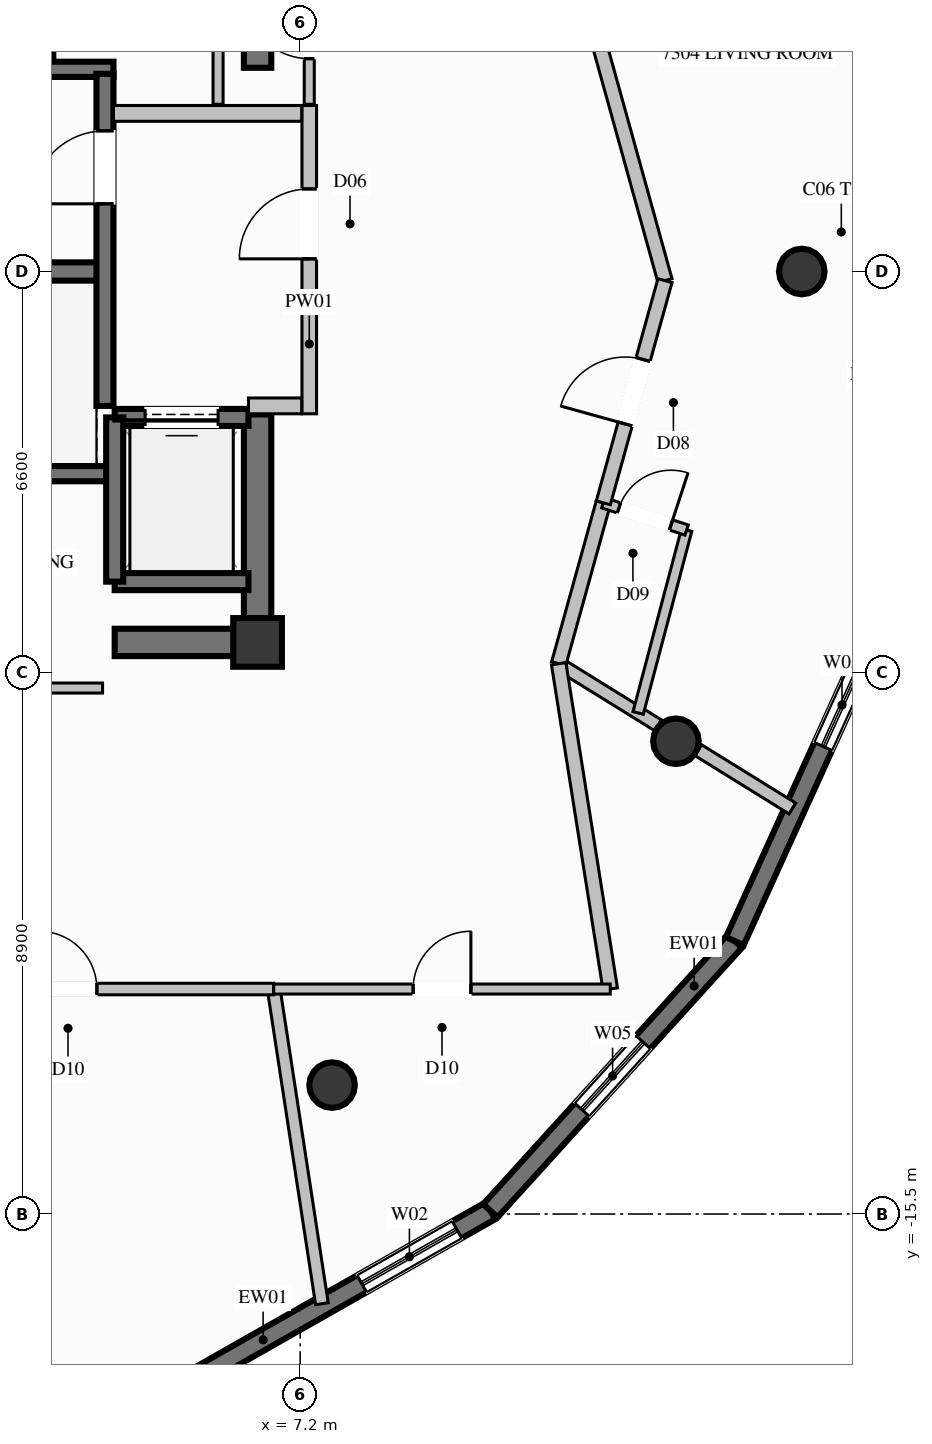
"""IFC4 building model, lengths in metres.
Left out: names, types, materials, properties, quantities, classifications, styles, units other than length and angle.
Written with IfcOpenShell. Run it as: python <this file> out.ifc"""

import sys

from ifc_helpers import new_model, si_unit, direction, frame, frame_2d, origin, origin_2d, place, context, subcontext, project, spatial, rectangle, circle, extrude, element, fill, save


model = new_model("IFC4")
c1 = context("Model", 3, precision=1e-05, world=origin(), true_north=direction((0.0, 1.0)))
c2 = subcontext(c1, "Body", "Model", "MODEL_VIEW")
j1 = project(units=[si_unit("LENGTHUNIT", "METRE"), si_unit("PLANEANGLEUNIT", "RADIAN")], contexts=[c1])
p1 = place(None, origin())
s1 = spatial("IfcSite", under=j1, at=p1, CompositionType="ELEMENT")
p2 = place(p1, origin())
s2 = spatial("IfcBuilding", under=s1, at=p2, CompositionType="ELEMENT")
p3 = place(p2, frame((0.0, 0.0, 274.4)))
s3 = spatial("IfcBuildingStorey", under=s2, at=p3, CompositionType="ELEMENT", Elevation=274.4)
p4 = place(p3, frame((6.5, -6.1, 0.0), z_axis=(0.0, 0.0, 1.0), x_axis=(1.0, 0.0, 0.0)))
e1 = element("IfcColumn", 1, at=p4, inside=s3, PredefinedType="COLUMN", context=c2, shape_type="SweptSolid", body=[
    extrude(rectangle(XDim=0.8, YDim=0.8, at=origin_2d()), origin(), (0.0, 0.0, 1.0), 3.8),
])
p5 = place(p3, frame((-3.99, 0.0, 0.0), z_axis=(0.0, 0.0, 1.0), x_axis=(1.0, 0.0, 0.0)))
e2 = element("IfcWall", 2, at=p5, inside=s3, PredefinedType="SHEAR", context=c2, shape_type="SweptSolid", body=[
    extrude(rectangle(XDim=7.98, YDim=0.3, at=frame_2d((3.99, 0.0))), origin(), (0.0, 0.0, 1.0), 3.8),
])
for number, where, z_axis, x_axis in (
    (3, (-4.13, -3.325, 0.0), (0.0, 0.0, 1.0), (1.0, 0.0, 0.0)),
    (4, (-4.13, 3.325, 0.0), (0.0, 0.0, 1.0), (1.0, 0.0, 0.0)),
):
    element("IfcWall", number, at=place(p3, frame(where, z_axis=z_axis, x_axis=x_axis)), inside=s3, PredefinedType="SOLIDWALL", context=c2, shape_type="SweptSolid", body=[
        extrude(rectangle(XDim=8.26, YDim=0.25, at=frame_2d((4.13, 0.0))), origin(), (0.0, 0.0, 1.0), 3.8),
    ])
p6 = place(p3, frame((4.15, -6.1, 0.0), z_axis=(0.0, 0.0, 1.0), x_axis=(1.0, 0.0, 0.0)))
e5 = element("IfcWall", 5, at=p6, inside=s3, PredefinedType="SHEAR", context=c2, shape_type="SweptSolid", body=[
    extrude(rectangle(XDim=2.125, YDim=0.45, at=frame_2d((1.062, 0.0))), origin(), (0.0, 0.0, 1.0), 3.8),
])
p7 = place(p3, frame((6.5, -6.325, 0.0), z_axis=(0.0, 0.0, 1.0), x_axis=(0.0, 1.0, 0.0)))
e6 = element("IfcWall", 6, at=p7, inside=s3, PredefinedType="SHEAR", context=c2, shape_type="SweptSolid", body=[
    extrude(rectangle(XDim=3.975, YDim=0.45, at=frame_2d((1.987, 0.0))), origin(), (0.0, 0.0, 1.0), 3.8),
])
p8 = place(p3, frame((6.5, 3.35, 0.0), z_axis=(0.0, 0.0, 1.0), x_axis=(0.0, 1.0, 0.0)))
e7 = element("IfcWall", 7, at=p8, inside=s3, PredefinedType="SHEAR", context=c2, shape_type="SweptSolid", body=[
    extrude(rectangle(XDim=2.975, YDim=0.45, at=frame_2d((1.487, 0.0))), origin(), (0.0, 0.0, 1.0), 3.8),
])
for number, where, z_axis, x_axis in (
    (8, (15.45, 0.0, 0.0), (0.0, 0.0, 1.0), (1.0, 0.0, 0.0)),
    (9, (7.725, -13.38, 0.0), (0.0, 0.0, 1.0), (1.0, 0.0, 0.0)),
    (10, (13.38, -7.725, 0.0), (0.0, 0.0, 1.0), (1.0, 0.0, 0.0)),
):
    element("IfcColumn", number, at=place(p3, frame(where, z_axis=z_axis, x_axis=x_axis)), inside=s3, PredefinedType="COLUMN", context=c2, shape_type="SweptSolid", body=[
        extrude(circle(Radius=0.375, at=origin_2d()), origin(), (0.0, 0.0, 1.0), 3.8),
    ])
p9 = place(p3, frame((10.329, -15.446, 0.0), z_axis=(0.0, 0.0, 1.0), x_axis=(-0.869520200799, -0.493897378413, 0.0)))
e11 = element("IfcWall", 11, at=p9, inside=s3, PredefinedType="SOLIDWALL", context=c2, shape_type="SweptSolid", body=[
    extrude(rectangle(XDim=5.916, YDim=0.32, at=frame_2d((2.958, 0.0))), origin(), (0.0, 0.0, 1.0), 3.57),
])
p10 = place(p9, frame((0.632, 0.0, 0.35)))
e12 = element("IfcOpeningElement", 12, at=p10, cuts=e11, PredefinedType="OPENING", context=c2, shape_type="SweptSolid", body=[
    extrude(rectangle(XDim=1.8, YDim=2.6, at=frame_2d((0.9, 1.3))), frame((0.0, 0.17, 0.0), z_axis=(0.0, -1.0, 0.0), x_axis=(1.0, 0.0, 0.0)), (0.0, 0.0, 1.0), 0.34),
])
p11 = place(p3, frame((14.349, -11.012, 0.0), z_axis=(0.0, 0.0, 1.0), x_axis=(-0.67166919047, -0.740851198671, 0.0)))
e13 = element("IfcWall", 13, at=p11, inside=s3, PredefinedType="SOLIDWALL", context=c2, shape_type="SweptSolid", body=[
    extrude(rectangle(XDim=5.985, YDim=0.32, at=frame_2d((2.993, 0.0))), origin(), (0.0, 0.0, 1.0), 3.57),
])
p12 = place(p11, frame((2.243, 0.0, 0.85)))
e14 = element("IfcOpeningElement", 14, at=p12, cuts=e13, PredefinedType="OPENING", context=c2, shape_type="SweptSolid", body=[
    extrude(rectangle(XDim=1.5, YDim=1.2, at=frame_2d((0.75, 0.6))), frame((0.0, 0.17, 0.0), z_axis=(0.0, -1.0, 0.0), x_axis=(1.0, 0.0, 0.0)), (0.0, 0.0, 1.0), 0.34),
])
p13 = place(p3, frame((16.851, -5.5, 0.0), z_axis=(0.0, 0.0, 1.0), x_axis=(-0.413325805639, -0.910583207836, 0.0)))
e15 = element("IfcWall", 15, at=p13, inside=s3, PredefinedType="SOLIDWALL", context=c2, shape_type="SweptSolid", body=[
    extrude(rectangle(XDim=6.053, YDim=0.32, at=frame_2d((3.027, 0.0))), origin(), (0.0, 0.0, 1.0), 3.57),
])
p14 = place(p13, frame((1.038, 0.0, 0.85)))
e16 = element("IfcOpeningElement", 16, at=p14, cuts=e15, PredefinedType="OPENING", context=c2, shape_type="SweptSolid", body=[
    extrude(rectangle(XDim=1.5, YDim=1.2, at=frame_2d((0.75, 0.6))), frame((0.0, 0.17, 0.0), z_axis=(0.0, -1.0, 0.0), x_axis=(1.0, 0.0, 0.0)), (0.0, 0.0, 1.0), 0.34),
])
p15 = place(p3, frame((3.0, 3.5, 0.0), z_axis=(0.0, 0.0, 1.0), x_axis=(0.0, 1.0, 0.0)))
e17 = element("IfcWall", 17, at=p15, inside=s3, PredefinedType="SOLIDWALL", context=c2, shape_type="SweptSolid", body=[
    extrude(rectangle(XDim=2.5, YDim=0.28, at=frame_2d((1.25, 0.0))), origin(), (0.0, 0.0, 1.0), 3.57),
])
p16 = place(p3, frame((4.15, -5.1, 0.0), z_axis=(0.0, 0.0, 1.0), x_axis=(1.0, 0.0, 0.0)))
e18 = element("IfcWall", 18, at=p16, inside=s3, PredefinedType="SOLIDWALL", context=c2, shape_type="SweptSolid", body=[
    extrude(rectangle(XDim=2.2, YDim=0.28, at=frame_2d((1.1, 0.0))), origin(), (0.0, 0.0, 1.0), 3.57),
])
p17 = place(p3, frame((6.35, -2.4, 0.0), z_axis=(0.0, 0.0, 1.0), x_axis=(-1.0, 0.0, 0.0)))
e19 = element("IfcWall", 19, at=p17, inside=s3, PredefinedType="SOLIDWALL", context=c2, shape_type="SweptSolid", body=[
    extrude(rectangle(XDim=2.2, YDim=0.28, at=frame_2d((1.1, 0.0))), origin(), (0.0, 0.0, 1.0), 3.57),
])
p18 = place(p17, frame((0.5, 0.0, 0.0)))
e20 = element("IfcOpeningElement", 20, at=p18, cuts=e19, PredefinedType="OPENING", context=c2, shape_type="SweptSolid", body=[
    extrude(rectangle(XDim=1.2, YDim=2.2, at=frame_2d((0.6, 1.1))), frame((0.0, 0.15, 0.0), z_axis=(0.0, -1.0, 0.0), x_axis=(1.0, 0.0, 0.0)), (0.0, 0.0, 1.0), 0.3),
])
p19 = place(p3, frame((4.15, -2.4, 0.0), z_axis=(0.0, 0.0, 1.0), x_axis=(0.0, -1.0, 0.0)))
e21 = element("IfcWall", 21, at=p19, inside=s3, PredefinedType="SOLIDWALL", context=c2, shape_type="SweptSolid", body=[
    extrude(rectangle(XDim=2.7, YDim=0.28, at=frame_2d((1.35, 0.0))), origin(), (0.0, 0.0, 1.0), 3.57),
])
p20 = place(p3, frame((3.99, -2.21, 0.0), z_axis=(0.0, 0.0, 1.0), x_axis=(0.0, 1.0, 0.0)))
e22 = element("IfcWall", 22, at=p20, inside=s3, PredefinedType="SOLIDWALL", context=c2, shape_type="SweptSolid", body=[
    extrude(rectangle(XDim=5.46, YDim=0.28, at=frame_2d((2.73, 0.0))), origin(), (0.0, 0.0, 1.0), 3.57),
])
p21 = place(p20, frame((3.323, 0.0, 0.0)))
e23 = element("IfcOpeningElement", 23, at=p21, cuts=e22, PredefinedType="OPENING", context=c2, shape_type="SweptSolid", body=[
    extrude(rectangle(XDim=1.2, YDim=2.2, at=frame_2d((0.6, 1.1))), frame((0.0, 0.15, 0.0), z_axis=(0.0, -1.0, 0.0), x_axis=(1.0, 0.0, 0.0)), (0.0, 0.0, 1.0), 0.3),
])
p22 = place(p3, frame((7.35, -2.34, 0.0), z_axis=(0.0, 0.0, 1.0), x_axis=(0.0, 1.0, 0.0)))
e24 = element("IfcWall", 24, at=p22, inside=s3, PredefinedType="PARTITIONING", context=c2, shape_type="SweptSolid", body=[
    extrude(rectangle(XDim=5.07, YDim=0.24, at=frame_2d((2.535, 0.0))), origin(), (0.0, 0.0, 1.0), 2.655),
])
p23 = place(p22, frame((2.548, 0.0, 0.0)))
e25 = element("IfcOpeningElement", 25, at=p23, cuts=e24, PredefinedType="OPENING", context=c2, shape_type="SweptSolid", body=[
    extrude(rectangle(XDim=1.15, YDim=2.2, at=frame_2d((0.575, 1.1))), frame((0.0, 0.13, 0.0), z_axis=(0.0, -1.0, 0.0), x_axis=(1.0, 0.0, 0.0)), (0.0, 0.0, 1.0), 0.26),
])
p24 = place(p3, frame((6.35, -2.21, 0.0), z_axis=(0.0, 0.0, 1.0), x_axis=(1.0, 0.0, 0.0)))
e26 = element("IfcWall", 26, at=p24, inside=s3, PredefinedType="PARTITIONING", context=c2, shape_type="SweptSolid", body=[
    extrude(rectangle(XDim=0.875, YDim=0.26, at=frame_2d((0.438, 0.0))), origin(), (0.0, 0.0, 1.0), 3.57),
])
p25 = place(p3, frame((4.13, 2.6, 0.0), z_axis=(0.0, 0.0, 1.0), x_axis=(1.0, 0.0, 0.0)))
e27 = element("IfcWall", 27, at=p25, inside=s3, PredefinedType="PARTITIONING", context=c2, shape_type="SweptSolid", body=[
    extrude(rectangle(XDim=3.095, YDim=0.26, at=frame_2d((1.548, 0.0))), origin(), (0.0, 0.0, 1.0), 3.57),
])
p26 = place(p3, frame((7.35, 2.75, 0.0), z_axis=(0.0, 0.0, 1.0), x_axis=(0.0, 1.0, 0.0)))
e28 = element("IfcWall", 28, at=p26, inside=s3, PredefinedType="PARTITIONING", context=c2, shape_type="SweptSolid", body=[
    extrude(rectangle(XDim=2.55, YDim=0.165, at=frame_2d((1.275, 0.0))), origin(), (0.0, 0.0, 1.0), 3.57),
])
p27 = place(p26, frame((0.75, 0.0, 0.0)))
e29 = element("IfcOpeningElement", 29, at=p27, cuts=e28, PredefinedType="OPENING", context=c2, shape_type="SweptSolid", body=[
    extrude(rectangle(XDim=1.05, YDim=2.15, at=frame_2d((0.525, 1.075))), frame((0.0, 0.093, 0.0), z_axis=(0.0, -1.0, 0.0), x_axis=(1.0, 0.0, 0.0)), (0.0, 0.0, 1.0), 0.185),
])
p28 = place(p3, frame((5.85, 5.3, 0.0), z_axis=(0.0, 0.0, 1.0), x_axis=(0.0, -1.0, 0.0)))
e30 = element("IfcWall", 30, at=p28, inside=s3, PredefinedType="PARTITIONING", context=c2, shape_type="SweptSolid", body=[
    extrude(rectangle(XDim=2.55, YDim=0.165, at=frame_2d((1.275, 0.0))), origin(), (0.0, 0.0, 1.0), 2.655),
])
p29 = place(p3, frame((-5.7, -6.85, 0.0), z_axis=(0.0, 0.0, 1.0), x_axis=(1.0, 0.0, 0.0)))
e31 = element("IfcWall", 31, at=p29, inside=s3, PredefinedType="PARTITIONING", context=c2, shape_type="SweptSolid", body=[
    extrude(rectangle(XDim=9.65, YDim=0.165, at=frame_2d((4.825, 0.0))), origin(), (0.0, 0.0, 1.0), 2.655),
])
p30 = place(p29, frame((4.35, 0.0, 0.0)))
e32 = element("IfcOpeningElement", 32, at=p30, cuts=e31, PredefinedType="OPENING", context=c2, shape_type="SweptSolid", body=[
    extrude(rectangle(XDim=0.95, YDim=2.1, at=frame_2d((0.475, 1.05))), frame((0.0, 0.093, 0.0), z_axis=(0.0, -1.0, 0.0), x_axis=(1.0, 0.0, 0.0)), (0.0, 0.0, 1.0), 0.185),
])
p31 = place(p3, frame((11.452, -6.45, 0.0), z_axis=(0.0, 0.0, 1.0), x_axis=(0.850026735641, -0.526739545407, 0.0)))
e33 = element("IfcWall", 33, at=p31, inside=s3, PredefinedType="PARTITIONING", context=c2, shape_type="SweptSolid", body=[
    extrude(rectangle(XDim=1.921, YDim=0.21, at=frame_2d((0.96, 0.0))), origin(), (0.0, 0.0, 1.0), 3.086),
])
p32 = place(p3, frame((13.747, -7.872, 0.0), z_axis=(0.0, 0.0, 1.0), x_axis=(0.850070781835, -0.526668459156, 0.0)))
e34 = element("IfcWall", 34, at=p32, inside=s3, PredefinedType="PARTITIONING", context=c2, shape_type="SweptSolid", body=[
    extrude(rectangle(XDim=1.821, YDim=0.21, at=frame_2d((0.91, 0.0))), origin(), (0.0, 0.0, 1.0), 3.57),
])
p33 = place(p3, frame((11.452, -6.45, 0.0), z_axis=(0.0, 0.0, 1.0), x_axis=(0.267350374135, 0.963599386389, 0.0)))
e35 = element("IfcWall", 35, at=p33, inside=s3, PredefinedType="PARTITIONING", context=c2, shape_type="SweptSolid", body=[
    extrude(rectangle(XDim=2.746, YDim=0.24, at=frame_2d((1.373, 0.0))), origin(), (0.0, 0.0, 1.0), 3.57),
])
p34 = place(p3, frame((12.759, -7.26, 0.0), z_axis=(0.0, 0.0, 1.0), x_axis=(0.256080164753, 0.966655548383, 0.0)))
e36 = element("IfcWall", 36, at=p34, inside=s3, PredefinedType="PLUMBINGWALL", context=c2, shape_type="SweptSolid", body=[
    extrude(rectangle(XDim=3.112, YDim=0.175, at=frame_2d((1.556, 0.0))), origin(), (0.0, 0.0, 1.0), 3.57),
])
p35 = place(p3, frame((12.186, -3.804, 0.0), z_axis=(0.0, 0.0, 1.0), x_axis=(0.950463569657, -0.310835974037, 0.0)))
e37 = element("IfcWall", 37, at=p35, inside=s3, PredefinedType="PLUMBINGWALL", context=c2, shape_type="SweptSolid", body=[
    extrude(rectangle(XDim=1.441, YDim=0.175, at=frame_2d((0.721, 0.0))), origin(), (0.0, 0.0, 1.0), 3.57),
])
p36 = place(p35, frame((0.271, 0.0, 0.0)))
e38 = element("IfcOpeningElement", 38, at=p36, cuts=e37, PredefinedType="OPENING", context=c2, shape_type="SweptSolid", body=[
    extrude(rectangle(XDim=0.9, YDim=2.1, at=frame_2d((0.45, 1.05))), frame((0.0, 0.098, 0.0), z_axis=(0.0, -1.0, 0.0), x_axis=(1.0, 0.0, 0.0)), (0.0, 0.0, 1.0), 0.195),
])
p37 = place(p3, frame((13.2, -0.15, 0.0), z_axis=(0.0, 0.0, 1.0), x_axis=(-0.267374214985, 0.963592771435, 0.0)))
e39 = element("IfcWall", 39, at=p37, inside=s3, PredefinedType="PARTITIONING", context=c2, shape_type="SweptSolid", body=[
    extrude(rectangle(XDim=6.538, YDim=0.24, at=frame_2d((3.269, 0.0))), origin(), (0.0, 0.0, 1.0), 3.57),
])
p38 = place(p3, frame((12.186, -3.804, 0.0), z_axis=(0.0, 0.0, 1.0), x_axis=(0.267374891444, 0.963592583733, 0.0)))
e40 = element("IfcWall", 40, at=p38, inside=s3, PredefinedType="PARTITIONING", context=c2, shape_type="SweptSolid", body=[
    extrude(rectangle(XDim=3.792, YDim=0.24, at=frame_2d((1.896, 0.0))), origin(), (0.0, 0.0, 1.0), 3.57),
])
p39 = place(p38, frame((1.346, 0.0, 0.0)))
e41 = element("IfcOpeningElement", 41, at=p39, cuts=e40, PredefinedType="OPENING", context=c2, shape_type="SweptSolid", body=[
    extrude(rectangle(XDim=1.1, YDim=2.3, at=frame_2d((0.55, 1.15))), frame((0.0, 0.13, 0.0), z_axis=(0.0, -1.0, 0.0), x_axis=(1.0, 0.0, 0.0)), (0.0, 0.0, 1.0), 0.26),
])
p40 = place(p3, frame((6.765, -11.8, 0.0), z_axis=(0.0, 0.0, 1.0), x_axis=(0.15150701221, -0.988456182767, 0.0)))
e42 = element("IfcWall", 42, at=p40, inside=s3, PredefinedType="PARTITIONING", context=c2, shape_type="SweptSolid", body=[
    extrude(rectangle(XDim=5.236, YDim=0.21, at=frame_2d((2.618, 0.0))), origin(), (0.0, 0.0, 1.0), 3.57),
])
p41 = place(p3, frame((0.0, -11.8, 0.0), z_axis=(0.0, 0.0, 1.0), x_axis=(1.0, 0.0, 0.0)))
e43 = element("IfcWall", 43, at=p41, inside=s3, PredefinedType="PARTITIONING", context=c2, shape_type="SweptSolid", body=[
    extrude(rectangle(XDim=6.765, YDim=0.19, at=frame_2d((3.382, 0.0))), origin(), (0.0, 0.0, 1.0), 3.57),
])
p42 = place(p41, frame((2.907, 0.0, 0.0)))
e44 = element("IfcOpeningElement", 44, at=p42, cuts=e43, PredefinedType="OPENING", context=c2, shape_type="SweptSolid", body=[
    extrude(rectangle(XDim=0.95, YDim=2.1, at=frame_2d((0.475, 1.05))), frame((0.0, 0.105, 0.0), z_axis=(0.0, -1.0, 0.0), x_axis=(1.0, 0.0, 0.0)), (0.0, 0.0, 1.0), 0.21),
])
p43 = place(p3, frame((12.3, -11.8, 0.0), z_axis=(0.0, 0.0, 1.0), x_axis=(-0.156573548098, 0.987666301964, 0.0)))
e45 = element("IfcWall", 45, at=p43, inside=s3, PredefinedType="PARTITIONING", context=c2, shape_type="SweptSolid", body=[
    extrude(rectangle(XDim=5.417, YDim=0.24, at=frame_2d((2.708, 0.0))), origin(), (0.0, 0.0, 1.0), 3.57),
])
p44 = place(p3, frame((6.765, -11.8, 0.0), z_axis=(0.0, 0.0, 1.0), x_axis=(1.0, 0.0, 0.0)))
e46 = element("IfcWall", 46, at=p44, inside=s3, PredefinedType="PARTITIONING", context=c2, shape_type="SweptSolid", body=[
    extrude(rectangle(XDim=5.535, YDim=0.165, at=frame_2d((2.768, 0.0))), origin(), (0.0, 0.0, 1.0), 3.57),
])
p45 = place(p44, frame((2.293, 0.0, 0.0)))
e47 = element("IfcOpeningElement", 47, at=p45, cuts=e46, PredefinedType="OPENING", context=c2, shape_type="SweptSolid", body=[
    extrude(rectangle(XDim=0.95, YDim=2.1, at=frame_2d((0.475, 1.05))), frame((0.0, 0.093, 0.0), z_axis=(0.0, -1.0, 0.0), x_axis=(1.0, 0.0, 0.0)), (0.0, 0.0, 1.0), 0.185),
])
p46 = place(p10, origin())
e48 = element("IfcWindow", 48, at=p46, inside=s3, PartitioningType="SINGLE_PANEL", PredefinedType="WINDOW", context=c2, shape_type="SweptSolid", body=[
    extrude(rectangle(XDim=1.8, YDim=2.6, at=frame_2d((0.9, 1.3))), frame((0.0, 0.03, 0.0), z_axis=(0.0, -1.0, 0.0), x_axis=(1.0, 0.0, 0.0)), (0.0, 0.0, 1.0), 0.06),
])
fill(e12, e48)
p47 = place(p12, origin())
e49 = element("IfcWindow", 49, at=p47, inside=s3, PartitioningType="SINGLE_PANEL", PredefinedType="WINDOW", context=c2, shape_type="SweptSolid", body=[
    extrude(rectangle(XDim=1.5, YDim=1.2, at=frame_2d((0.75, 0.6))), frame((0.0, 0.03, 0.0), z_axis=(0.0, -1.0, 0.0), x_axis=(1.0, 0.0, 0.0)), (0.0, 0.0, 1.0), 0.06),
])
fill(e14, e49)
p48 = place(p14, origin())
e50 = element("IfcWindow", 50, at=p48, inside=s3, PartitioningType="SINGLE_PANEL", PredefinedType="WINDOW", context=c2, shape_type="SweptSolid", body=[
    extrude(rectangle(XDim=1.5, YDim=1.2, at=frame_2d((0.75, 0.6))), frame((0.0, 0.03, 0.0), z_axis=(0.0, -1.0, 0.0), x_axis=(1.0, 0.0, 0.0)), (0.0, 0.0, 1.0), 0.06),
])
fill(e16, e50)
p49 = place(p18, origin())
e51 = element("IfcDoor", 51, at=p49, inside=s3, OperationType="SLIDING_TO_LEFT", PredefinedType="DOOR", context=c2, shape_type="SweptSolid", body=[
    extrude(rectangle(XDim=1.2, YDim=2.2, at=frame_2d((0.6, 1.1))), frame((0.0, 0.025, 0.0), z_axis=(0.0, -1.0, 0.0), x_axis=(1.0, 0.0, 0.0)), (0.0, 0.0, 1.0), 0.05),
])
fill(e20, e51)
p50 = place(p21, origin())
e52 = element("IfcDoor", 52, at=p50, inside=s3, OperationType="SINGLE_SWING_LEFT", PredefinedType="DOOR", context=c2, shape_type="SweptSolid", body=[
    extrude(rectangle(XDim=1.2, YDim=2.2, at=frame_2d((0.6, 1.1))), frame((0.0, 0.025, 0.0), z_axis=(0.0, -1.0, 0.0), x_axis=(1.0, 0.0, 0.0)), (0.0, 0.0, 1.0), 0.05),
])
fill(e23, e52)
p51 = place(p23, origin())
e53 = element("IfcDoor", 53, at=p51, inside=s3, OperationType="SINGLE_SWING_LEFT", PredefinedType="DOOR", context=c2, shape_type="SweptSolid", body=[
    extrude(rectangle(XDim=1.15, YDim=2.2, at=frame_2d((0.575, 1.1))), frame((0.0, 0.025, 0.0), z_axis=(0.0, -1.0, 0.0), x_axis=(1.0, 0.0, 0.0)), (0.0, 0.0, 1.0), 0.05),
])
fill(e25, e53)
p52 = place(p27, origin())
e54 = element("IfcDoor", 54, at=p52, inside=s3, OperationType="SINGLE_SWING_RIGHT", PredefinedType="DOOR", context=c2, shape_type="SweptSolid", body=[
    extrude(rectangle(XDim=1.05, YDim=2.15, at=frame_2d((0.525, 1.075))), frame((0.0, 0.025, 0.0), z_axis=(0.0, -1.0, 0.0), x_axis=(1.0, 0.0, 0.0)), (0.0, 0.0, 1.0), 0.05),
])
fill(e29, e54)
p53 = place(p36, origin())
e55 = element("IfcDoor", 55, at=p53, inside=s3, OperationType="SINGLE_SWING_RIGHT", PredefinedType="DOOR", context=c2, shape_type="SweptSolid", body=[
    extrude(rectangle(XDim=0.9, YDim=2.1, at=frame_2d((0.45, 1.05))), frame((0.0, 0.025, 0.0), z_axis=(0.0, -1.0, 0.0), x_axis=(1.0, 0.0, 0.0)), (0.0, 0.0, 1.0), 0.05),
])
fill(e38, e55)
p54 = place(p39, origin())
e56 = element("IfcDoor", 56, at=p54, inside=s3, OperationType="SINGLE_SWING_LEFT", PredefinedType="DOOR", context=c2, shape_type="SweptSolid", body=[
    extrude(rectangle(XDim=1.1, YDim=2.3, at=frame_2d((0.55, 1.15))), frame((0.0, 0.025, 0.0), z_axis=(0.0, -1.0, 0.0), x_axis=(1.0, 0.0, 0.0)), (0.0, 0.0, 1.0), 0.05),
])
fill(e41, e56)
p55 = place(p42, origin())
e57 = element("IfcDoor", 57, at=p55, inside=s3, OperationType="SINGLE_SWING_LEFT", PredefinedType="DOOR", context=c2, shape_type="SweptSolid", body=[
    extrude(rectangle(XDim=0.95, YDim=2.1, at=frame_2d((0.475, 1.05))), frame((0.0, 0.025, 0.0), z_axis=(0.0, -1.0, 0.0), x_axis=(1.0, 0.0, 0.0)), (0.0, 0.0, 1.0), 0.05),
])
fill(e44, e57)
p56 = place(p45, origin())
e58 = element("IfcDoor", 58, at=p56, inside=s3, OperationType="SINGLE_SWING_RIGHT", PredefinedType="DOOR", context=c2, shape_type="SweptSolid", body=[
    extrude(rectangle(XDim=0.95, YDim=2.1, at=frame_2d((0.475, 1.05))), frame((0.0, 0.025, 0.0), z_axis=(0.0, -1.0, 0.0), x_axis=(1.0, 0.0, 0.0)), (0.0, 0.0, 1.0), 0.05),
])
fill(e47, e58)
save(model, sys.argv[1])
